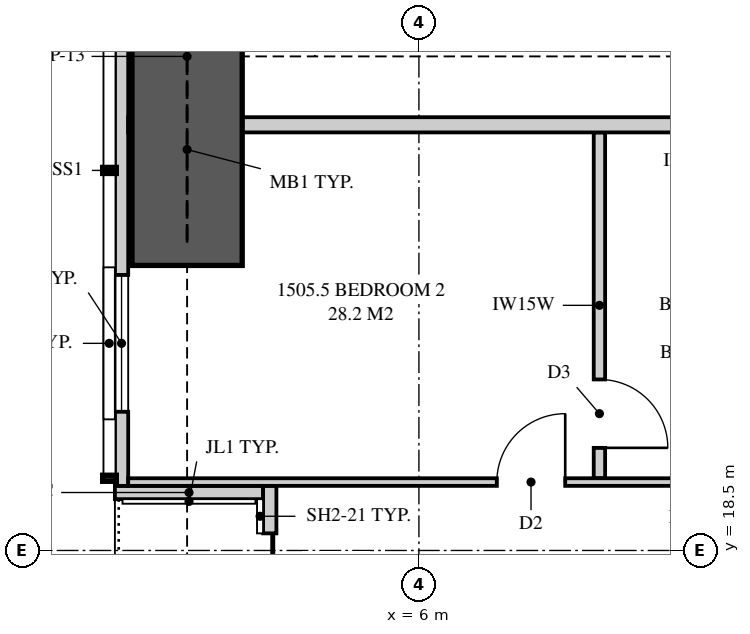
"""IFC4 building model, lengths in metres.
Left out: names, types, materials, properties, quantities, classifications, styles, units other than length and angle.
Written with IfcOpenShell. Run it as: python <this file> out.ifc"""

import sys

from ifc_helpers import new_model, si_unit, direction, frame, frame_2d, origin, place, context, subcontext, project, spatial, polyline, rectangle, outline, extrude, element, fill, save


model = new_model("IFC4")
c1 = context("Model", 3, precision=1e-05, world=origin(), true_north=direction((0.0, 1.0)))
c2 = subcontext(c1, "Body", "Model", "MODEL_VIEW")
j1 = project(units=[si_unit("LENGTHUNIT", "METRE"), si_unit("PLANEANGLEUNIT", "RADIAN")], contexts=[c1])
p1 = place(None, origin())
s1 = spatial("IfcSite", under=j1, at=p1, CompositionType="ELEMENT")
p2 = place(p1, origin())
s2 = spatial("IfcBuilding", under=s1, at=p2, CompositionType="ELEMENT")
p3 = place(p2, frame((0.0, 0.0, 57.85)))
s3 = spatial("IfcBuildingStorey", under=s2, at=p3, CompositionType="ELEMENT", Elevation=57.85)
p4 = place(p3, frame((2.087, 34.949, 0.0), z_axis=(0.0, 0.0, 1.0), x_axis=(0.0, -1.0, 0.0)))
e1 = element("IfcWall", 1, at=p4, inside=s3, PredefinedType="SOLIDWALL", context=c2, shape_type="SweptSolid", body=[
    extrude(outline(polyline([(0.0, 0.0), (15.599, 0.0), (15.599, 2.15), (9.949, 2.15), (9.949, 3.11), (9.823, 3.11), (9.823, 2.15), (9.73, 2.15), (9.73, 3.11), (0.0, 3.11), (0.0, 0.0)])), frame((0.0, 0.087, 0.0), z_axis=(0.0, -1.0, 0.0), x_axis=(1.0, 0.0, 0.0)), (0.0, 0.0, 1.0), 0.175),
])
p5 = place(p4, frame((2.722, 0.0, 0.4)))
e2 = element("IfcOpeningElement", 2, at=p5, cuts=e1, PredefinedType="OPENING", context=c2, shape_type="SweptSolid", body=[
    extrude(rectangle(XDim=1.8, YDim=1.7, at=frame_2d((0.9, 0.85))), frame((0.0, 0.097, 0.0), z_axis=(0.0, -1.0, 0.0), x_axis=(1.0, 0.0, 0.0)), (0.0, 0.0, 1.0), 0.195),
])
p6 = place(p4, frame((5.899, 0.0, 0.4)))
e3 = element("IfcOpeningElement", 3, at=p6, cuts=e1, PredefinedType="OPENING", context=c2, shape_type="SweptSolid", body=[
    extrude(rectangle(XDim=1.2, YDim=1.7, at=frame_2d((0.6, 0.85))), frame((0.0, 0.097, 0.0), z_axis=(0.0, -1.0, 0.0), x_axis=(1.0, 0.0, 0.0)), (0.0, 0.0, 1.0), 0.195),
])
p7 = place(p4, frame((12.824, 0.0, 0.4)))
e4 = element("IfcOpeningElement", 4, at=p7, cuts=e1, PredefinedType="OPENING", context=c2, shape_type="SweptSolid", body=[
    extrude(rectangle(XDim=1.8, YDim=1.7, at=frame_2d((0.9, 0.85))), frame((0.0, 0.097, 0.0), z_axis=(0.0, -1.0, 0.0), x_axis=(1.0, 0.0, 0.0)), (0.0, 0.0, 1.0), 0.195),
])
p8 = place(p3, frame((4.038, 19.35, 0.0), z_axis=(0.0, 0.0, 1.0), x_axis=(0.0, -1.0, 0.0)))
e5 = element("IfcWall", 5, at=p8, inside=s3, PredefinedType="SOLIDWALL", context=c2, shape_type="SweptSolid", body=[
    extrude(rectangle(XDim=3.05, YDim=0.175, at=frame_2d((1.525, 0.0))), origin(), (0.0, 0.0, 1.0), 3.11),
])
p9 = place(p8, frame((0.625, 0.0, 0.0)))
e6 = element("IfcOpeningElement", 6, at=p9, cuts=e5, PredefinedType="OPENING", context=c2, shape_type="SweptSolid", body=[
    extrude(rectangle(XDim=1.8, YDim=2.1, at=frame_2d((0.9, 1.05))), frame((0.0, 0.097, 0.0), z_axis=(0.0, -1.0, 0.0), x_axis=(1.0, 0.0, 0.0)), (0.0, 0.0, 1.0), 0.195),
])
p10 = place(p3, frame((2.0, 19.262, 0.0), z_axis=(0.0, 0.0, 1.0), x_axis=(1.0, 0.0, 0.0)))
e7 = element("IfcWall", 7, at=p10, inside=s3, PredefinedType="SOLIDWALL", context=c2, shape_type="SweptSolid", body=[
    extrude(outline(polyline([(0.0, 0.0), (1.95, 0.0), (1.95, 3.11), (1.75, 3.11), (1.75, 2.15), (0.15, 2.15), (0.15, 3.11), (0.0, 3.11), (0.0, 0.0)])), frame((0.0, 0.087, 0.0), z_axis=(0.0, -1.0, 0.0), x_axis=(1.0, 0.0, 0.0)), (0.0, 0.0, 1.0), 0.175),
])
p11 = place(p3, frame((2.175, 24.1, 0.0), z_axis=(0.0, 0.0, 1.0), x_axis=(1.0, 0.0, 0.0)))
e8 = element("IfcWall", 8, at=p11, inside=s3, PredefinedType="PARTITIONING", context=c2, shape_type="SweptSolid", body=[
    extrude(outline(polyline([(0.529, 2.15), (0.0, 2.15), (0.0, 0.0), (0.529, 0.0), (0.529, 0.889), (1.021, 0.889), (1.021, 0.0), (15.35, 0.0), (15.35, 3.11), (9.335, 3.11), (9.335, 2.51), (6.715, 2.51), (6.715, 3.11), (1.685, 3.11), (1.685, 2.15), (1.021, 2.15), (1.021, 1.261), (0.529, 1.261), (0.529, 2.15)])), frame((0.0, 0.1, 0.0), z_axis=(0.0, -1.0, 0.0), x_axis=(1.0, 0.0, 0.0)), (0.0, 0.0, 1.0), 0.2),
])
p12 = place(p3, frame((2.175, 19.4, 0.0), z_axis=(0.0, 0.0, 1.0), x_axis=(1.0, 0.0, 0.0)))
e9 = element("IfcWall", 9, at=p12, inside=s3, PredefinedType="PARTITIONING", context=c2, shape_type="SweptSolid", body=[
    extrude(outline(polyline([(0.0, 0.0), (15.35, 0.0), (15.35, 3.11), (9.285, 3.11), (9.285, 2.51), (6.765, 2.51), (6.765, 3.11), (1.635, 3.11), (1.635, 2.15), (0.0, 2.15), (0.0, 3.11), (0.0, 0.0)])), frame((0.0, 0.05, 0.0), z_axis=(0.0, -1.0, 0.0), x_axis=(1.0, 0.0, 0.0)), (0.0, 0.0, 1.0), 0.1),
])
p13 = place(p12, frame((4.85, 0.0, 0.0)))
e10 = element("IfcOpeningElement", 10, at=p13, cuts=e9, PredefinedType="OPENING", context=c2, shape_type="SweptSolid", body=[
    extrude(rectangle(XDim=0.9, YDim=2.1, at=frame_2d((0.45, 1.05))), frame((0.0, 0.06, 0.0), z_axis=(0.0, -1.0, 0.0), x_axis=(1.0, 0.0, 0.0)), (0.0, 0.0, 1.0), 0.12),
])
p14 = place(p12, frame((11.675, 0.0, 0.0)))
e11 = element("IfcOpeningElement", 11, at=p14, cuts=e9, PredefinedType="OPENING", context=c2, shape_type="SweptSolid", body=[
    extrude(rectangle(XDim=0.7, YDim=2.1, at=frame_2d((0.35, 1.05))), frame((0.0, 0.06, 0.0), z_axis=(0.0, -1.0, 0.0), x_axis=(1.0, 0.0, 0.0)), (0.0, 0.0, 1.0), 0.12),
])
p15 = place(p3, frame((8.375, 19.45, 0.0), z_axis=(0.0, 0.0, 1.0), x_axis=(0.0, 1.0, 0.0)))
e12 = element("IfcWall", 12, at=p15, inside=s3, PredefinedType="PLUMBINGWALL", context=c2, shape_type="SweptSolid", body=[
    extrude(rectangle(XDim=4.55, YDim=0.15, at=frame_2d((2.275, 0.0))), origin(), (0.0, 0.0, 1.0), 3.11),
])
p16 = place(p15, frame((0.4, 0.0, 0.0)))
e13 = element("IfcOpeningElement", 13, at=p16, cuts=e12, PredefinedType="OPENING", context=c2, shape_type="SweptSolid", body=[
    extrude(rectangle(XDim=0.9, YDim=2.1, at=frame_2d((0.45, 1.05))), frame((0.0, 0.085, 0.0), z_axis=(0.0, -1.0, 0.0), x_axis=(1.0, 0.0, 0.0)), (0.0, 0.0, 1.0), 0.17),
])
p17 = place(p3, frame((2.95, 22.25, 0.0), z_axis=(0.0, 0.0, 1.0), x_axis=(0.0, 1.0, 0.0)))
e14 = element("IfcWall", 14, at=p17, inside=s3, PredefinedType="SHEAR", context=c2, shape_type="SweptSolid", body=[
    extrude(rectangle(XDim=5.5, YDim=1.45, at=frame_2d((2.75, 0.0))), origin(), (0.0, 0.0, 1.0), 3.35),
])
p18 = place(p7, origin())
e15 = element("IfcWindow", 15, at=p18, inside=s3, PartitioningType="SINGLE_PANEL", PredefinedType="WINDOW", context=c2, shape_type="SweptSolid", body=[
    extrude(rectangle(XDim=1.8, YDim=1.7, at=frame_2d((0.9, 0.85))), frame((0.0, 0.03, 0.0), z_axis=(0.0, -1.0, 0.0), x_axis=(1.0, 0.0, 0.0)), (0.0, 0.0, 1.0), 0.06),
])
fill(e4, e15)
p19 = place(p9, origin())
e16 = element("IfcDoor", 16, at=p19, inside=s3, OperationType="SLIDING_TO_LEFT", PredefinedType="DOOR", context=c2, shape_type="SweptSolid", body=[
    extrude(rectangle(XDim=1.8, YDim=2.1, at=frame_2d((0.9, 1.05))), frame((0.0, 0.025, 0.0), z_axis=(0.0, -1.0, 0.0), x_axis=(1.0, 0.0, 0.0)), (0.0, 0.0, 1.0), 0.05),
])
fill(e6, e16)
p20 = place(p13, origin())
e17 = element("IfcDoor", 17, at=p20, inside=s3, OperationType="SINGLE_SWING_RIGHT", PredefinedType="DOOR", context=c2, shape_type="SweptSolid", body=[
    extrude(rectangle(XDim=0.9, YDim=2.1, at=frame_2d((0.45, 1.05))), frame((0.0, 0.025, 0.0), z_axis=(0.0, -1.0, 0.0), x_axis=(1.0, 0.0, 0.0)), (0.0, 0.0, 1.0), 0.05),
])
fill(e10, e17)
p21 = place(p16, frame((0.9, 0.0, 0.0), z_axis=(0.0, 0.0, 1.0), x_axis=(-1.0, 0.0, 0.0)))
e18 = element("IfcDoor", 18, at=p21, inside=s3, OperationType="SINGLE_SWING_RIGHT", PredefinedType="DOOR", context=c2, shape_type="SweptSolid", body=[
    extrude(rectangle(XDim=0.9, YDim=2.1, at=frame_2d((0.45, 1.05))), frame((0.0, 0.025, 0.0), z_axis=(0.0, -1.0, 0.0), x_axis=(1.0, 0.0, 0.0)), (0.0, 0.0, 1.0), 0.05),
])
fill(e13, e18)
save(model, sys.argv[1])
